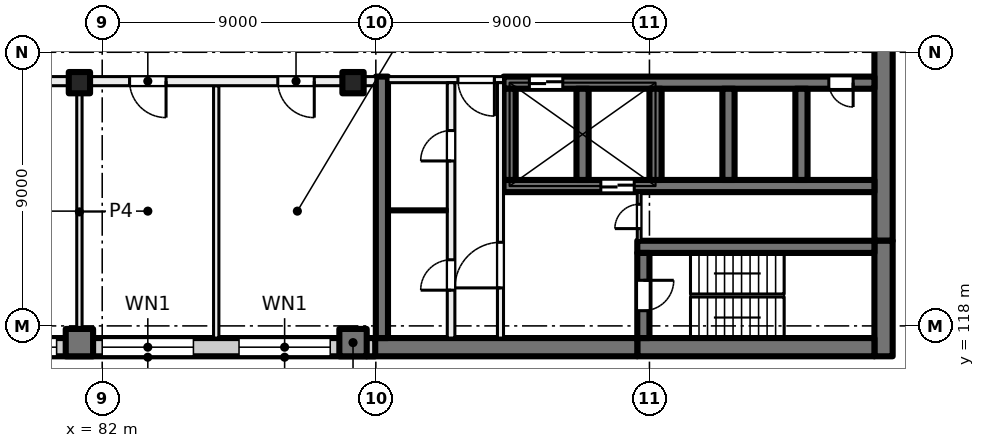
"""IFC4 building model, lengths in metres.
Left out: names, types, materials, properties, quantities, classifications, styles, units other than length and angle.
Written with IfcOpenShell. Run it as: python <this file> out.ifc"""

import sys

from ifc_helpers import new_model, si_unit, direction, frame, frame_2d, origin, origin_2d, place, context, subcontext, project, spatial, rectangle, extrude, element, fill, save


model = new_model("IFC4")
c1 = context("Model", 3, precision=1e-05, world=origin(), true_north=direction((0.0, 1.0)))
c2 = subcontext(c1, "Body", "Model", "MODEL_VIEW")
j1 = project(units=[si_unit("LENGTHUNIT", "METRE"), si_unit("PLANEANGLEUNIT", "RADIAN")], contexts=[c1])
p1 = place(None, origin())
s1 = spatial("IfcSite", under=j1, at=p1, CompositionType="ELEMENT")
p2 = place(p1, origin())
s2 = spatial("IfcBuilding", under=s1, at=p2, CompositionType="ELEMENT")
p3 = place(p2, frame((0.0, 0.0, 39.5)))
s3 = spatial("IfcBuildingStorey", under=s2, at=p3, CompositionType="ELEMENT", Elevation=39.5)
for number, where, z_axis, x_axis in (
    (1, (81.25, 126.0, 0.0), (0.0, 0.0, 1.0), (1.0, 0.0, 0.0)),
    (2, (90.25, 126.0, 0.0), (0.0, 0.0, 1.0), (1.0, 0.0, 0.0)),
):
    element("IfcColumn", number, at=place(p3, frame(where, z_axis=z_axis, x_axis=x_axis)), inside=s3, PredefinedType="COLUMN", context=c2, shape_type="SweptSolid", body=[
        extrude(rectangle(XDim=0.7, YDim=0.7, at=origin_2d()), origin(), (0.0, 0.0, 1.0), 4.0),
    ])
for number, where, z_axis, x_axis in (
    (3, (81.25, 117.45, 0.0), (0.0, 0.0, 1.0), (1.0, 0.0, 0.0)),
    (4, (90.25, 117.45, 0.0), (0.0, 0.0, 1.0), (1.0, 0.0, 0.0)),
):
    element("IfcColumn", number, at=place(p3, frame(where, z_axis=z_axis, x_axis=x_axis)), inside=s3, PredefinedType="COLUMN", context=c2, shape_type="SweptSolid", body=[
        extrude(rectangle(XDim=0.9, YDim=0.9, at=origin_2d()), origin(), (0.0, 0.0, 1.0), 4.0),
    ])
p4 = place(p3, frame((107.7, 135.2, 0.0), z_axis=(0.0, 0.0, 1.0), x_axis=(0.0, -1.0, 0.0)))
e5 = element("IfcWall", 5, at=p4, inside=s3, PredefinedType="SHEAR", context=c2, shape_type="SweptSolid", body=[
    extrude(rectangle(XDim=14.4, YDim=0.6, at=frame_2d((7.2, 0.0))), origin(), (0.0, 0.0, 1.0), 4.0),
])
p5 = place(p3, frame((107.7, 120.8, 0.0), z_axis=(0.0, 0.0, 1.0), x_axis=(0.0, -1.0, 0.0)))
e6 = element("IfcWall", 6, at=p5, inside=s3, PredefinedType="SHEAR", context=c2, shape_type="SweptSolid", body=[
    extrude(rectangle(XDim=3.8, YDim=0.6, at=frame_2d((1.9, 0.0))), origin(), (0.0, 0.0, 1.0), 4.0),
])
p6 = place(p3, frame((107.4, 117.3, 0.0), z_axis=(0.0, 0.0, 1.0), x_axis=(-1.0, 0.0, 0.0)))
e7 = element("IfcWall", 7, at=p6, inside=s3, PredefinedType="SHEAR", context=c2, shape_type="SweptSolid", body=[
    extrude(rectangle(XDim=7.8, YDim=0.6, at=frame_2d((3.9, 0.0))), origin(), (0.0, 0.0, 1.0), 4.0),
])
p7 = place(p3, frame((99.6, 117.3, 0.0), z_axis=(0.0, 0.0, 1.0), x_axis=(-1.0, 0.0, 0.0)))
e8 = element("IfcWall", 8, at=p7, inside=s3, PredefinedType="SHEAR", context=c2, shape_type="SweptSolid", body=[
    extrude(rectangle(XDim=8.9, YDim=0.6, at=frame_2d((4.45, 0.0))), origin(), (0.0, 0.0, 1.0), 4.0),
])
p8 = place(p3, frame((107.4, 120.6, 0.0), z_axis=(0.0, 0.0, 1.0), x_axis=(-1.0, 0.0, 0.0)))
e9 = element("IfcWall", 9, at=p8, inside=s3, PredefinedType="SHEAR", context=c2, shape_type="SweptSolid", body=[
    extrude(rectangle(XDim=7.8, YDim=0.4, at=frame_2d((3.9, 0.0))), origin(), (0.0, 0.0, 1.0), 4.0),
])
p9 = place(p3, frame((99.8, 120.4, 0.0), z_axis=(0.0, 0.0, 1.0), x_axis=(0.0, -1.0, 0.0)))
e10 = element("IfcWall", 10, at=p9, inside=s3, PredefinedType="SHEAR", context=c2, shape_type="SweptSolid", body=[
    extrude(rectangle(XDim=2.8, YDim=0.4, at=frame_2d((1.4, 0.0))), origin(), (0.0, 0.0, 1.0), 4.0),
])
p10 = place(p9, frame((0.9, 0.0, 0.0)))
e11 = element("IfcOpeningElement", 11, at=p10, cuts=e10, PredefinedType="OPENING", context=c2, shape_type="SweptSolid", body=[
    extrude(rectangle(XDim=1.0, YDim=2.1, at=frame_2d((0.5, 1.05))), frame((0.0, 0.21, 0.0), z_axis=(0.0, -1.0, 0.0), x_axis=(1.0, 0.0, 0.0)), (0.0, 0.0, 1.0), 0.42),
])
p11 = place(p3, frame((107.4, 126.0, 0.0), z_axis=(0.0, 0.0, 1.0), x_axis=(-1.0, 0.0, 0.0)))
e12 = element("IfcWall", 12, at=p11, inside=s3, PredefinedType="SHEAR", context=c2, shape_type="SweptSolid", body=[
    extrude(rectangle(XDim=12.2, YDim=0.4, at=frame_2d((6.1, 0.0))), origin(), (0.0, 0.0, 1.0), 4.0),
])
p12 = place(p11, frame((10.25, 0.0, 0.0)))
e13 = element("IfcOpeningElement", 13, at=p12, cuts=e12, PredefinedType="OPENING", context=c2, shape_type="SweptSolid", body=[
    extrude(rectangle(XDim=1.1, YDim=2.1, at=frame_2d((0.55, 1.05))), frame((0.0, 0.21, 0.0), z_axis=(0.0, -1.0, 0.0), x_axis=(1.0, 0.0, 0.0)), (0.0, 0.0, 1.0), 0.42),
])
p13 = place(p11, frame((0.7, 0.0, 0.0)))
e14 = element("IfcOpeningElement", 14, at=p13, cuts=e12, PredefinedType="OPENING", context=c2, shape_type="SweptSolid", body=[
    extrude(rectangle(XDim=0.8, YDim=2.1, at=frame_2d((0.4, 1.05))), frame((0.0, 0.21, 0.0), z_axis=(0.0, -1.0, 0.0), x_axis=(1.0, 0.0, 0.0)), (0.0, 0.0, 1.0), 0.42),
])
p14 = place(p3, frame((107.4, 122.6, 0.0), z_axis=(0.0, 0.0, 1.0), x_axis=(-1.0, 0.0, 0.0)))
e15 = element("IfcWall", 15, at=p14, inside=s3, PredefinedType="SHEAR", context=c2, shape_type="SweptSolid", body=[
    extrude(rectangle(XDim=12.2, YDim=0.4, at=frame_2d((6.1, 0.0))), origin(), (0.0, 0.0, 1.0), 4.0),
])
p15 = place(p14, frame((7.9, 0.0, 0.0)))
e16 = element("IfcOpeningElement", 16, at=p15, cuts=e15, PredefinedType="OPENING", context=c2, shape_type="SweptSolid", body=[
    extrude(rectangle(XDim=1.1, YDim=2.1, at=frame_2d((0.55, 1.05))), frame((0.0, 0.21, 0.0), z_axis=(0.0, -1.0, 0.0), x_axis=(1.0, 0.0, 0.0)), (0.0, 0.0, 1.0), 0.42),
])
for number, where, z_axis, x_axis in (
    (17, (105.0, 125.8, 0.0), (0.0, 0.0, 1.0), (0.0, -1.0, 0.0)),
    (18, (102.6, 125.8, 0.0), (0.0, 0.0, 1.0), (0.0, -1.0, 0.0)),
    (19, (100.2, 125.8, 0.0), (0.0, 0.0, 1.0), (0.0, -1.0, 0.0)),
    (20, (97.8, 125.8, 0.0), (0.0, 0.0, 1.0), (0.0, -1.0, 0.0)),
    (21, (95.4, 125.8, 0.0), (0.0, 0.0, 1.0), (0.0, -1.0, 0.0)),
):
    element("IfcWall", number, at=place(p3, frame(where, z_axis=z_axis, x_axis=x_axis)), inside=s3, PredefinedType="SHEAR", context=c2, shape_type="SweptSolid", body=[
        extrude(rectangle(XDim=3.0, YDim=0.4, at=frame_2d((1.5, 0.0))), origin(), (0.0, 0.0, 1.0), 4.0),
    ])
p16 = place(p3, frame((91.2, 126.2, 0.0), z_axis=(0.0, 0.0, 1.0), x_axis=(0.0, -1.0, 0.0)))
e22 = element("IfcWall", 22, at=p16, inside=s3, PredefinedType="SHEAR", context=c2, shape_type="SweptSolid", body=[
    extrude(rectangle(XDim=8.6, YDim=0.4, at=frame_2d((4.3, 0.0))), origin(), (0.0, 0.0, 1.0), 4.0),
])
p17 = place(p3, frame((90.98, 117.3, 0.0), z_axis=(0.0, 0.0, 1.0), x_axis=(-1.0, 0.0, 0.0)))
e23 = element("IfcWall", 23, at=p17, inside=s3, PredefinedType="SOLIDWALL", context=c2, shape_type="SweptSolid", body=[
    extrude(rectangle(XDim=33.745, YDim=0.6, at=frame_2d((16.873, 0.0))), origin(), (0.0, 0.0, 1.0), 3.625),
])
p18 = place(p17, frame((1.48, 0.0, 0.9)))
e24 = element("IfcOpeningElement", 24, at=p18, cuts=e23, PredefinedType="OPENING", context=c2, shape_type="SweptSolid", body=[
    extrude(rectangle(XDim=3.0, YDim=2.4, at=frame_2d((1.5, 1.2))), frame((0.0, 0.31, 0.0), z_axis=(0.0, -1.0, 0.0), x_axis=(1.0, 0.0, 0.0)), (0.0, 0.0, 1.0), 0.62),
])
p19 = place(p17, frame((5.98, 0.0, 0.9)))
e25 = element("IfcOpeningElement", 25, at=p19, cuts=e23, PredefinedType="OPENING", context=c2, shape_type="SweptSolid", body=[
    extrude(rectangle(XDim=3.0, YDim=2.4, at=frame_2d((1.5, 1.2))), frame((0.0, 0.31, 0.0), z_axis=(0.0, -1.0, 0.0), x_axis=(1.0, 0.0, 0.0)), (0.0, 0.0, 1.0), 0.62),
])
p20 = place(p17, frame((10.48, 0.0, 0.9)))
e26 = element("IfcOpeningElement", 26, at=p20, cuts=e23, PredefinedType="OPENING", context=c2, shape_type="SweptSolid", body=[
    extrude(rectangle(XDim=3.0, YDim=2.4, at=frame_2d((1.5, 1.2))), frame((0.0, 0.31, 0.0), z_axis=(0.0, -1.0, 0.0), x_axis=(1.0, 0.0, 0.0)), (0.0, 0.0, 1.0), 0.62),
])
p21 = place(p17, frame((14.98, 0.0, 0.9)))
e27 = element("IfcOpeningElement", 27, at=p21, cuts=e23, PredefinedType="OPENING", context=c2, shape_type="SweptSolid", body=[
    extrude(rectangle(XDim=3.0, YDim=2.4, at=frame_2d((1.5, 1.2))), frame((0.0, 0.31, 0.0), z_axis=(0.0, -1.0, 0.0), x_axis=(1.0, 0.0, 0.0)), (0.0, 0.0, 1.0), 0.62),
])
p22 = place(p17, frame((19.48, 0.0, 0.9)))
e28 = element("IfcOpeningElement", 28, at=p22, cuts=e23, PredefinedType="OPENING", context=c2, shape_type="SweptSolid", body=[
    extrude(rectangle(XDim=3.0, YDim=2.4, at=frame_2d((1.5, 1.2))), frame((0.0, 0.31, 0.0), z_axis=(0.0, -1.0, 0.0), x_axis=(1.0, 0.0, 0.0)), (0.0, 0.0, 1.0), 0.62),
])
p23 = place(p17, frame((23.98, 0.0, 0.9)))
e29 = element("IfcOpeningElement", 29, at=p23, cuts=e23, PredefinedType="OPENING", context=c2, shape_type="SweptSolid", body=[
    extrude(rectangle(XDim=3.0, YDim=2.4, at=frame_2d((1.5, 1.2))), frame((0.0, 0.31, 0.0), z_axis=(0.0, -1.0, 0.0), x_axis=(1.0, 0.0, 0.0)), (0.0, 0.0, 1.0), 0.62),
])
p24 = place(p17, frame((28.48, 0.0, 0.9)))
e30 = element("IfcOpeningElement", 30, at=p24, cuts=e23, PredefinedType="OPENING", context=c2, shape_type="SweptSolid", body=[
    extrude(rectangle(XDim=3.0, YDim=2.4, at=frame_2d((1.5, 1.2))), frame((0.0, 0.31, 0.0), z_axis=(0.0, -1.0, 0.0), x_axis=(1.0, 0.0, 0.0)), (0.0, 0.0, 1.0), 0.62),
])
p25 = place(p3, frame((95.2, 126.1, 0.0), z_axis=(0.0, 0.0, 1.0), x_axis=(-1.0, 0.0, 0.0)))
e31 = element("IfcWall", 31, at=p25, inside=s3, PredefinedType="PARTITIONING", context=c2, shape_type="SweptSolid", body=[
    extrude(rectangle(XDim=3.8, YDim=0.2, at=frame_2d((1.9, 0.0))), origin(), (0.0, 0.0, 1.0), 3.625),
])
p26 = place(p25, frame((0.3, 0.0, 0.0)))
e32 = element("IfcOpeningElement", 32, at=p26, cuts=e31, PredefinedType="OPENING", context=c2, shape_type="SweptSolid", body=[
    extrude(rectangle(XDim=1.2, YDim=2.1, at=frame_2d((0.6, 1.05))), frame((0.0, 0.11, 0.0), z_axis=(0.0, -1.0, 0.0), x_axis=(1.0, 0.0, 0.0)), (0.0, 0.0, 1.0), 0.22),
])
p27 = place(p3, frame((95.1, 117.6, 0.0), z_axis=(0.0, 0.0, 1.0), x_axis=(0.0, 1.0, 0.0)))
e33 = element("IfcWall", 33, at=p27, inside=s3, PredefinedType="PARTITIONING", context=c2, shape_type="SweptSolid", body=[
    extrude(rectangle(XDim=8.4, YDim=0.2, at=frame_2d((4.2, 0.0))), origin(), (0.0, 0.0, 1.0), 3.625),
])
p28 = place(p27, frame((1.65, 0.0, 0.0)))
e34 = element("IfcOpeningElement", 34, at=p28, cuts=e33, PredefinedType="OPENING", context=c2, shape_type="SweptSolid", body=[
    extrude(rectangle(XDim=1.5, YDim=2.1, at=frame_2d((0.75, 1.05))), frame((0.0, 0.11, 0.0), z_axis=(0.0, -1.0, 0.0), x_axis=(1.0, 0.0, 0.0)), (0.0, 0.0, 1.0), 0.22),
])
p29 = place(p3, frame((93.475, 117.6, 0.0), z_axis=(0.0, 0.0, 1.0), x_axis=(0.0, 1.0, 0.0)))
e35 = element("IfcWall", 35, at=p29, inside=s3, PredefinedType="PARTITIONING", context=c2, shape_type="SweptSolid", body=[
    extrude(rectangle(XDim=8.4, YDim=0.25, at=frame_2d((4.2, 0.0))), origin(), (0.0, 0.0, 1.0), 3.625),
])
p30 = place(p29, frame((5.825, 0.0, 0.0)))
e36 = element("IfcOpeningElement", 36, at=p30, cuts=e35, PredefinedType="OPENING", context=c2, shape_type="SweptSolid", body=[
    extrude(rectangle(XDim=1.0, YDim=2.1, at=frame_2d((0.5, 1.05))), frame((0.0, 0.135, 0.0), z_axis=(0.0, -1.0, 0.0), x_axis=(1.0, 0.0, 0.0)), (0.0, 0.0, 1.0), 0.27),
])
p31 = place(p29, frame((1.575, 0.0, 0.0)))
e37 = element("IfcOpeningElement", 37, at=p31, cuts=e35, PredefinedType="OPENING", context=c2, shape_type="SweptSolid", body=[
    extrude(rectangle(XDim=1.0, YDim=2.1, at=frame_2d((0.5, 1.05))), frame((0.0, 0.135, 0.0), z_axis=(0.0, -1.0, 0.0), x_axis=(1.0, 0.0, 0.0)), (0.0, 0.0, 1.0), 0.27),
])
p32 = place(p3, frame((99.663, 120.8, 0.0), z_axis=(0.0, 0.0, 1.0), x_axis=(0.0, 1.0, 0.0)))
e38 = element("IfcWall", 38, at=p32, inside=s3, PredefinedType="PARTITIONING", context=c2, shape_type="SweptSolid", body=[
    extrude(rectangle(XDim=1.6, YDim=0.125, at=frame_2d((0.8, 0.0))), origin(), (0.0, 0.0, 1.0), 3.625),
])
p33 = place(p32, frame((0.4, 0.0, 0.0)))
e39 = element("IfcOpeningElement", 39, at=p33, cuts=e38, PredefinedType="OPENING", context=c2, shape_type="SweptSolid", body=[
    extrude(rectangle(XDim=0.8, YDim=2.1, at=frame_2d((0.4, 1.05))), frame((0.0, 0.073, 0.0), z_axis=(0.0, -1.0, 0.0), x_axis=(1.0, 0.0, 0.0)), (0.0, 0.0, 1.0), 0.145),
])
p34 = place(p3, frame((93.35, 121.8, 0.0), z_axis=(0.0, 0.0, 1.0), x_axis=(-1.0, 0.0, 0.0)))
e40 = element("IfcWall", 40, at=p34, inside=s3, PredefinedType="PARTITIONING", context=c2, shape_type="SweptSolid", body=[
    extrude(rectangle(XDim=1.95, YDim=0.1, at=frame_2d((0.975, 0.0))), origin(), (0.0, 0.0, 1.0), 3.625),
])
for number, where, z_axis, x_axis in (
    (41, (81.25, 117.6, 0.0), (0.0, 0.0, 1.0), (0.0, 1.0, 0.0)),
    (42, (85.75, 117.6, 0.0), (0.0, 0.0, 1.0), (0.0, 1.0, 0.0)),
):
    element("IfcWall", number, at=place(p3, frame(where, z_axis=z_axis, x_axis=x_axis)), inside=s3, PredefinedType="PARTITIONING", context=c2, shape_type="SweptSolid", body=[
        extrude(rectangle(XDim=8.3, YDim=0.175, at=frame_2d((4.15, 0.0))), origin(), (0.0, 0.0, 1.0), 3.625),
    ])
p35 = place(p3, frame((91.0, 126.05, 0.0), z_axis=(0.0, 0.0, 1.0), x_axis=(-1.0, 0.0, 0.0)))
e43 = element("IfcWall", 43, at=p35, inside=s3, PredefinedType="PARTITIONING", context=c2, shape_type="SweptSolid", body=[
    extrude(rectangle(XDim=43.785, YDim=0.3, at=frame_2d((21.893, 0.0))), origin(), (0.0, 0.0, 1.0), 3.625),
])
p36 = place(p35, frame((2.025, 0.0, 0.0)))
e44 = element("IfcOpeningElement", 44, at=p36, cuts=e43, PredefinedType="OPENING", context=c2, shape_type="SweptSolid", body=[
    extrude(rectangle(XDim=1.2, YDim=2.1, at=frame_2d((0.6, 1.05))), frame((0.0, 0.16, 0.0), z_axis=(0.0, -1.0, 0.0), x_axis=(1.0, 0.0, 0.0)), (0.0, 0.0, 1.0), 0.32),
])
p37 = place(p35, frame((6.9, 0.0, 0.0)))
e45 = element("IfcOpeningElement", 45, at=p37, cuts=e43, PredefinedType="OPENING", context=c2, shape_type="SweptSolid", body=[
    extrude(rectangle(XDim=1.2, YDim=2.1, at=frame_2d((0.6, 1.05))), frame((0.0, 0.16, 0.0), z_axis=(0.0, -1.0, 0.0), x_axis=(1.0, 0.0, 0.0)), (0.0, 0.0, 1.0), 0.32),
])
p38 = place(p35, frame((15.6, 0.0, 0.0)))
e46 = element("IfcOpeningElement", 46, at=p38, cuts=e43, PredefinedType="OPENING", context=c2, shape_type="SweptSolid", body=[
    extrude(rectangle(XDim=1.8, YDim=2.1, at=frame_2d((0.9, 1.05))), frame((0.0, 0.16, 0.0), z_axis=(0.0, -1.0, 0.0), x_axis=(1.0, 0.0, 0.0)), (0.0, 0.0, 1.0), 0.32),
])
p39 = place(p35, frame((39.296, 0.0, 0.0)))
e47 = element("IfcOpeningElement", 47, at=p39, cuts=e43, PredefinedType="OPENING", context=c2, shape_type="SweptSolid", body=[
    extrude(rectangle(XDim=1.8, YDim=2.1, at=frame_2d((0.9, 1.05))), frame((0.0, 0.16, 0.0), z_axis=(0.0, -1.0, 0.0), x_axis=(1.0, 0.0, 0.0)), (0.0, 0.0, 1.0), 0.32),
])
p40 = place(p18, origin())
e48 = element("IfcWindow", 48, at=p40, inside=s3, PartitioningType="SINGLE_PANEL", PredefinedType="WINDOW", context=c2, shape_type="SweptSolid", body=[
    extrude(rectangle(XDim=3.0, YDim=2.4, at=frame_2d((1.5, 1.2))), frame((0.0, 0.03, 0.0), z_axis=(0.0, -1.0, 0.0), x_axis=(1.0, 0.0, 0.0)), (0.0, 0.0, 1.0), 0.06),
])
fill(e24, e48)
p41 = place(p19, origin())
e49 = element("IfcWindow", 49, at=p41, inside=s3, PartitioningType="SINGLE_PANEL", PredefinedType="WINDOW", context=c2, shape_type="SweptSolid", body=[
    extrude(rectangle(XDim=3.0, YDim=2.4, at=frame_2d((1.5, 1.2))), frame((0.0, 0.03, 0.0), z_axis=(0.0, -1.0, 0.0), x_axis=(1.0, 0.0, 0.0)), (0.0, 0.0, 1.0), 0.06),
])
fill(e25, e49)
p42 = place(p20, origin())
e50 = element("IfcWindow", 50, at=p42, inside=s3, PartitioningType="SINGLE_PANEL", PredefinedType="WINDOW", context=c2, shape_type="SweptSolid", body=[
    extrude(rectangle(XDim=3.0, YDim=2.4, at=frame_2d((1.5, 1.2))), frame((0.0, 0.03, 0.0), z_axis=(0.0, -1.0, 0.0), x_axis=(1.0, 0.0, 0.0)), (0.0, 0.0, 1.0), 0.06),
])
fill(e26, e50)
p43 = place(p12, origin())
e51 = element("IfcDoor", 51, at=p43, inside=s3, OperationType="DOUBLE_DOOR_SLIDING", PredefinedType="DOOR", context=c2, shape_type="SweptSolid", body=[
    extrude(rectangle(XDim=1.1, YDim=2.1, at=frame_2d((0.55, 1.05))), frame((0.0, 0.025, 0.0), z_axis=(0.0, -1.0, 0.0), x_axis=(1.0, 0.0, 0.0)), (0.0, 0.0, 1.0), 0.05),
])
fill(e13, e51)
p44 = place(p13, origin())
e52 = element("IfcDoor", 52, at=p44, inside=s3, OperationType="SINGLE_SWING_LEFT", PredefinedType="DOOR", context=c2, shape_type="SweptSolid", body=[
    extrude(rectangle(XDim=0.8, YDim=2.1, at=frame_2d((0.4, 1.05))), frame((0.0, 0.025, 0.0), z_axis=(0.0, -1.0, 0.0), x_axis=(1.0, 0.0, 0.0)), (0.0, 0.0, 1.0), 0.05),
])
fill(e14, e52)
p45 = place(p26, origin())
e53 = element("IfcDoor", 53, at=p45, inside=s3, OperationType="DOUBLE_DOOR_SINGLE_SWING", PredefinedType="DOOR", context=c2, shape_type="SweptSolid", body=[
    extrude(rectangle(XDim=1.2, YDim=2.1, at=frame_2d((0.6, 1.05))), frame((0.0, 0.025, 0.0), z_axis=(0.0, -1.0, 0.0), x_axis=(1.0, 0.0, 0.0)), (0.0, 0.0, 1.0), 0.05),
])
fill(e32, e53)
p46 = place(p28, origin())
e54 = element("IfcDoor", 54, at=p46, inside=s3, OperationType="DOUBLE_DOOR_SINGLE_SWING", PredefinedType="DOOR", context=c2, shape_type="SweptSolid", body=[
    extrude(rectangle(XDim=1.5, YDim=2.1, at=frame_2d((0.75, 1.05))), frame((0.0, 0.025, 0.0), z_axis=(0.0, -1.0, 0.0), x_axis=(1.0, 0.0, 0.0)), (0.0, 0.0, 1.0), 0.05),
])
fill(e34, e54)
p47 = place(p10, origin())
e55 = element("IfcDoor", 55, at=p47, inside=s3, OperationType="SINGLE_SWING_LEFT", PredefinedType="DOOR", context=c2, shape_type="SweptSolid", body=[
    extrude(rectangle(XDim=1.0, YDim=2.1, at=frame_2d((0.5, 1.05))), frame((0.0, 0.025, 0.0), z_axis=(0.0, -1.0, 0.0), x_axis=(1.0, 0.0, 0.0)), (0.0, 0.0, 1.0), 0.05),
])
fill(e11, e55)
p48 = place(p33, origin())
e56 = element("IfcDoor", 56, at=p48, inside=s3, OperationType="SINGLE_SWING_RIGHT", PredefinedType="DOOR", context=c2, shape_type="SweptSolid", body=[
    extrude(rectangle(XDim=0.8, YDim=2.1, at=frame_2d((0.4, 1.05))), frame((0.0, 0.025, 0.0), z_axis=(0.0, -1.0, 0.0), x_axis=(1.0, 0.0, 0.0)), (0.0, 0.0, 1.0), 0.05),
])
fill(e39, e56)
p49 = place(p30, origin())
e57 = element("IfcDoor", 57, at=p49, inside=s3, OperationType="SINGLE_SWING_LEFT", PredefinedType="DOOR", context=c2, shape_type="SweptSolid", body=[
    extrude(rectangle(XDim=1.0, YDim=2.1, at=frame_2d((0.5, 1.05))), frame((0.0, 0.025, 0.0), z_axis=(0.0, -1.0, 0.0), x_axis=(1.0, 0.0, 0.0)), (0.0, 0.0, 1.0), 0.05),
])
fill(e36, e57)
p50 = place(p31, origin())
e58 = element("IfcDoor", 58, at=p50, inside=s3, OperationType="SINGLE_SWING_RIGHT", PredefinedType="DOOR", context=c2, shape_type="SweptSolid", body=[
    extrude(rectangle(XDim=1.0, YDim=2.1, at=frame_2d((0.5, 1.05))), frame((0.0, 0.025, 0.0), z_axis=(0.0, -1.0, 0.0), x_axis=(1.0, 0.0, 0.0)), (0.0, 0.0, 1.0), 0.05),
])
fill(e37, e58)
p51 = place(p15, origin())
e59 = element("IfcDoor", 59, at=p51, inside=s3, OperationType="DOUBLE_DOOR_SLIDING", PredefinedType="DOOR", context=c2, shape_type="SweptSolid", body=[
    extrude(rectangle(XDim=1.1, YDim=2.1, at=frame_2d((0.55, 1.05))), frame((0.0, 0.025, 0.0), z_axis=(0.0, -1.0, 0.0), x_axis=(1.0, 0.0, 0.0)), (0.0, 0.0, 1.0), 0.05),
])
fill(e16, e59)
p52 = place(p36, origin())
e60 = element("IfcDoor", 60, at=p52, inside=s3, OperationType="DOUBLE_DOOR_SINGLE_SWING", PredefinedType="DOOR", context=c2, shape_type="SweptSolid", body=[
    extrude(rectangle(XDim=1.2, YDim=2.1, at=frame_2d((0.6, 1.05))), frame((0.0, 0.025, 0.0), z_axis=(0.0, -1.0, 0.0), x_axis=(1.0, 0.0, 0.0)), (0.0, 0.0, 1.0), 0.05),
])
fill(e44, e60)
p53 = place(p37, origin())
e61 = element("IfcDoor", 61, at=p53, inside=s3, OperationType="DOUBLE_DOOR_SINGLE_SWING", PredefinedType="DOOR", context=c2, shape_type="SweptSolid", body=[
    extrude(rectangle(XDim=1.2, YDim=2.1, at=frame_2d((0.6, 1.05))), frame((0.0, 0.025, 0.0), z_axis=(0.0, -1.0, 0.0), x_axis=(1.0, 0.0, 0.0)), (0.0, 0.0, 1.0), 0.05),
])
fill(e45, e61)
save(model, sys.argv[1])
